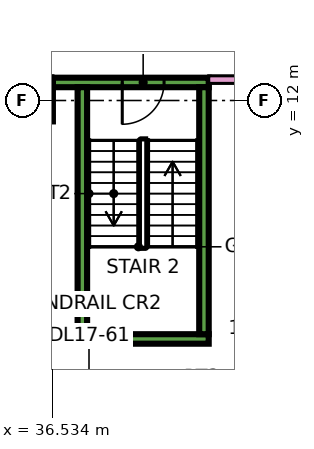
"""IFC4 building model, lengths in metres.
Left out: names, types, materials, properties, quantities, classifications, styles, units other than length and angle.
Written with IfcOpenShell. Run it as: python <this file> out.ifc"""

import sys

from ifc_helpers import new_model, si_unit, direction, frame, frame_2d, origin, origin_2d, place, context, subcontext, project, spatial, rectangle, extrude, element, fill, save


model = new_model("IFC4")
c1 = context("Model", 3, precision=1e-05, world=origin(), true_north=direction((0.0, 1.0)))
c2 = subcontext(c1, "Body", "Model", "MODEL_VIEW")
j1 = project(units=[si_unit("LENGTHUNIT", "METRE"), si_unit("PLANEANGLEUNIT", "RADIAN")], contexts=[c1])
p1 = place(None, origin())
s1 = spatial("IfcSite", under=j1, at=p1, CompositionType="ELEMENT")
p2 = place(p1, origin())
s2 = spatial("IfcBuilding", under=s1, at=p2, CompositionType="ELEMENT")
p3 = place(p2, frame((0.0, 0.0, 78.9)))
s3 = spatial("IfcBuildingStorey", under=s2, at=p3, CompositionType="ELEMENT", Elevation=78.9)
p4 = place(p3, frame((36.0, 12.0, 0.0), z_axis=(0.0, 0.0, 1.0), x_axis=(1.0, 0.0, 0.0)))
e1 = element("IfcColumn", 1, at=p4, inside=s3, PredefinedType="COLUMN", context=c2, shape_type="SweptSolid", body=[
    extrude(rectangle(XDim=1.1, YDim=1.1, at=origin_2d()), origin(), (0.0, 0.0, 1.0), 3.75),
])
p5 = place(p3, frame((37.2, 5.725, 0.0), z_axis=(0.0, 0.0, 1.0), x_axis=(1.0, 0.0, 0.0)))
e2 = element("IfcWall", 2, at=p5, inside=s3, PredefinedType="SHEAR", context=c2, shape_type="SweptSolid", body=[
    extrude(rectangle(XDim=3.45, YDim=0.25, at=frame_2d((1.725, 0.0))), origin(), (0.0, 0.0, 1.0), 3.75),
])
p6 = place(p3, frame((36.55, 12.475, 0.0), z_axis=(0.0, 0.0, 1.0), x_axis=(1.0, 0.0, 0.0)))
e3 = element("IfcWall", 3, at=p6, inside=s3, PredefinedType="SHEAR", context=c2, shape_type="SweptSolid", body=[
    extrude(rectangle(XDim=4.1, YDim=0.25, at=frame_2d((2.05, 0.0))), origin(), (0.0, 0.0, 1.0), 3.75),
])
p7 = place(p6, frame((1.825, 0.0, 0.0)))
e4 = element("IfcOpeningElement", 4, at=p7, cuts=e3, PredefinedType="OPENING", context=c2, shape_type="SweptSolid", body=[
    extrude(rectangle(XDim=1.1, YDim=2.2, at=frame_2d((0.55, 1.1))), frame((0.0, 0.135, 0.0), z_axis=(0.0, -1.0, 0.0), x_axis=(1.0, 0.0, 0.0)), (0.0, 0.0, 1.0), 0.27),
])
for number, where, z_axis, x_axis in (
    (5, (37.325, 5.85, 0.0), (0.0, 0.0, 1.0), (0.0, 1.0, 0.0)),
    (6, (40.525, 5.85, 0.0), (0.0, 0.0, 1.0), (0.0, 1.0, 0.0)),
):
    element("IfcWall", number, at=place(p3, frame(where, z_axis=z_axis, x_axis=x_axis)), inside=s3, PredefinedType="SHEAR", context=c2, shape_type="SweptSolid", body=[
        extrude(rectangle(XDim=6.5, YDim=0.25, at=frame_2d((3.25, 0.0))), origin(), (0.0, 0.0, 1.0), 3.75),
    ])
p8 = place(p3, frame((34.0, 12.55, 0.0), z_axis=(0.0, 0.0, 1.0), x_axis=(1.0, 0.0, 0.0)))
e7 = element("IfcWall", 7, at=p8, inside=s3, PredefinedType="PARTITIONING", context=c2, shape_type="SweptSolid", body=[
    extrude(rectangle(XDim=2.551, YDim=0.2, at=frame_2d((1.275, 0.0))), origin(), (0.0, 0.0, 1.0), 3.35),
])
p9 = place(p3, frame((40.65, 12.55, 0.0), z_axis=(0.0, 0.0, 1.0), x_axis=(1.0, 0.0, 0.0)))
e8 = element("IfcWall", 8, at=p9, inside=s3, PredefinedType="PARTITIONING", context=c2, shape_type="SweptSolid", body=[
    extrude(rectangle(XDim=28.125, YDim=0.2, at=frame_2d((14.062, 0.0))), origin(), (0.0, 0.0, 1.0), 3.35),
])
p10 = place(p9, frame((11.4, 0.0, 0.0)))
e9 = element("IfcOpeningElement", 9, at=p10, cuts=e8, PredefinedType="OPENING", context=c2, shape_type="SweptSolid", body=[
    extrude(rectangle(XDim=1.0, YDim=2.1, at=frame_2d((0.5, 1.05))), frame((0.0, 0.11, 0.0), z_axis=(0.0, -1.0, 0.0), x_axis=(1.0, 0.0, 0.0)), (0.0, 0.0, 1.0), 0.22),
])
p11 = place(p9, frame((1.05, 0.0, 0.0)))
e10 = element("IfcOpeningElement", 10, at=p11, cuts=e8, PredefinedType="OPENING", context=c2, shape_type="SweptSolid", body=[
    extrude(rectangle(XDim=1.0, YDim=2.1, at=frame_2d((0.5, 1.05))), frame((0.0, 0.11, 0.0), z_axis=(0.0, -1.0, 0.0), x_axis=(1.0, 0.0, 0.0)), (0.0, 0.0, 1.0), 0.22),
])
p12 = place(p7, frame((1.1, 0.0, 0.0), z_axis=(0.0, 0.0, 1.0), x_axis=(-1.0, 0.0, 0.0)))
e11 = element("IfcDoor", 11, at=p12, inside=s3, OperationType="SINGLE_SWING_LEFT", PredefinedType="DOOR", context=c2, shape_type="SweptSolid", body=[
    extrude(rectangle(XDim=1.1, YDim=2.2, at=frame_2d((0.55, 1.1))), frame((0.0, 0.025, 0.0), z_axis=(0.0, -1.0, 0.0), x_axis=(1.0, 0.0, 0.0)), (0.0, 0.0, 1.0), 0.05),
])
fill(e4, e11)
save(model, sys.argv[1])
